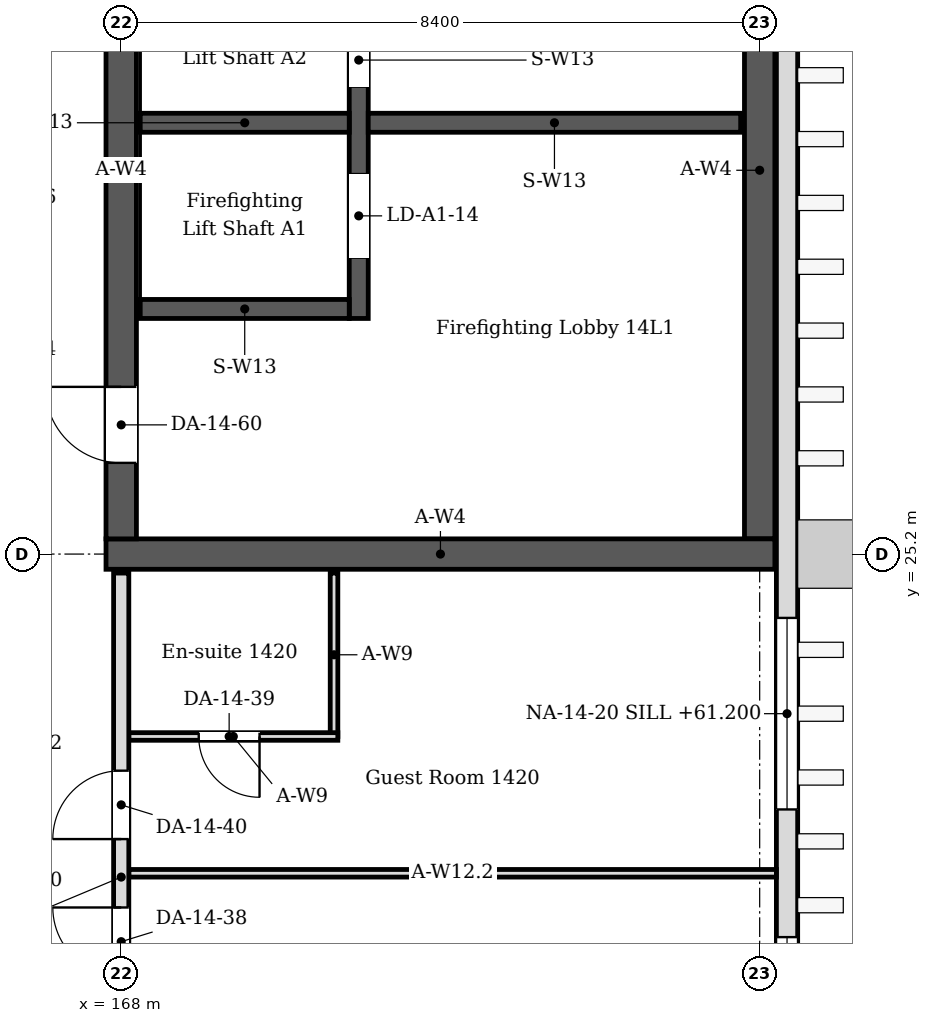
"""IFC4 building model, lengths in metres.
Left out: names, types, materials, properties, quantities, classifications, styles, units other than length and angle.
Written with IfcOpenShell. Run it as: python <this file> out.ifc"""

import sys

from ifc_helpers import new_model, si_unit, direction, frame, frame_2d, origin, place, context, subcontext, project, spatial, rectangle, extrude, element, fill, save


model = new_model("IFC4")
c1 = context("Model", 3, precision=1e-05, world=origin(), true_north=direction((0.0, 1.0)))
c2 = subcontext(c1, "Body", "Model", "MODEL_VIEW")
j1 = project(units=[si_unit("LENGTHUNIT", "METRE"), si_unit("PLANEANGLEUNIT", "RADIAN")], contexts=[c1])
p1 = place(None, origin())
s1 = spatial("IfcSite", under=j1, at=p1, CompositionType="ELEMENT")
p2 = place(p1, origin())
s2 = spatial("IfcBuilding", under=s1, at=p2, CompositionType="ELEMENT")
p3 = place(p2, frame((0.0, 0.0, 60.6)))
s3 = spatial("IfcBuildingStorey", under=s2, at=p3, CompositionType="ELEMENT", Elevation=60.6)
p4 = place(p3, frame((167.8, 25.2, 0.0), z_axis=(0.0, 0.0, 1.0), x_axis=(1.0, 0.0, 0.0)))
e1 = element("IfcWall", 1, at=p4, inside=s3, PredefinedType="SOLIDWALL", context=c2, shape_type="SweptSolid", body=[
    extrude(rectangle(XDim=8.8, YDim=0.4, at=frame_2d((4.4, 0.0))), origin(), (0.0, 0.0, 1.0), 4.05),
])
p5 = place(p3, frame((168.0, 25.4, 0.0), z_axis=(0.0, 0.0, 1.0), x_axis=(0.0, 1.0, 0.0)))
e2 = element("IfcWall", 2, at=p5, inside=s3, PredefinedType="SOLIDWALL", context=c2, shape_type="SweptSolid", body=[
    extrude(rectangle(XDim=16.4, YDim=0.4, at=frame_2d((8.2, 0.0))), origin(), (0.0, 0.0, 1.0), 4.05),
])
p6 = place(p5, frame((1.0, 0.0, 0.0)))
e3 = element("IfcOpeningElement", 3, at=p6, cuts=e2, PredefinedType="OPENING", context=c2, shape_type="SweptSolid", body=[
    extrude(rectangle(XDim=1.0, YDim=2.1, at=frame_2d((0.5, 1.05))), frame((0.0, 0.21, 0.0), z_axis=(0.0, -1.0, 0.0), x_axis=(1.0, 0.0, 0.0)), (0.0, 0.0, 1.0), 0.42),
])
p7 = place(p5, frame((14.4, 0.0, 0.0)))
e4 = element("IfcOpeningElement", 4, at=p7, cuts=e2, PredefinedType="OPENING", context=c2, shape_type="SweptSolid", body=[
    extrude(rectangle(XDim=1.4, YDim=2.1, at=frame_2d((0.7, 1.05))), frame((0.0, 0.21, 0.0), z_axis=(0.0, -1.0, 0.0), x_axis=(1.0, 0.0, 0.0)), (0.0, 0.0, 1.0), 0.42),
])
p8 = place(p3, frame((176.4, 25.4, 0.0), z_axis=(0.0, 0.0, 1.0), x_axis=(0.0, 1.0, 0.0)))
e5 = element("IfcWall", 5, at=p8, inside=s3, PredefinedType="SOLIDWALL", context=c2, shape_type="SweptSolid", body=[
    extrude(rectangle(XDim=16.4, YDim=0.4, at=frame_2d((8.2, 0.0))), origin(), (0.0, 0.0, 1.0), 4.05),
])
p9 = place(p3, frame((176.76, -0.22, 0.0), z_axis=(0.0, 0.0, 1.0), x_axis=(0.0, 1.0, 0.0)))
e6 = element("IfcWall", 6, at=p9, inside=s3, PredefinedType="SOLIDWALL", context=c2, shape_type="SweptSolid", body=[
    extrude(rectangle(XDim=67.64, YDim=0.28, at=frame_2d((33.82, 0.0))), origin(), (0.0, 0.0, 1.0), 4.05),
])
p10 = place(p9, frame((9.88, 0.0, 0.45)))
e7 = element("IfcOpeningElement", 7, at=p10, cuts=e6, PredefinedType="OPENING", context=c2, shape_type="SweptSolid", body=[
    extrude(rectangle(XDim=2.52, YDim=2.1, at=frame_2d((1.26, 1.05))), frame((0.0, 0.15, 0.0), z_axis=(0.0, -1.0, 0.0), x_axis=(1.0, 0.0, 0.0)), (0.0, 0.0, 1.0), 0.3),
])
p11 = place(p9, frame((14.08, 0.0, 0.6)))
e8 = element("IfcOpeningElement", 8, at=p11, cuts=e6, PredefinedType="OPENING", context=c2, shape_type="SweptSolid", body=[
    extrude(rectangle(XDim=2.52, YDim=2.4, at=frame_2d((1.26, 1.2))), frame((0.0, 0.15, 0.0), z_axis=(0.0, -1.0, 0.0), x_axis=(1.0, 0.0, 0.0)), (0.0, 0.0, 1.0), 0.3),
])
p12 = place(p9, frame((17.86, 0.0, 0.6)))
e9 = element("IfcOpeningElement", 9, at=p12, cuts=e6, PredefinedType="OPENING", context=c2, shape_type="SweptSolid", body=[
    extrude(rectangle(XDim=2.52, YDim=2.4, at=frame_2d((1.26, 1.2))), frame((0.0, 0.15, 0.0), z_axis=(0.0, -1.0, 0.0), x_axis=(1.0, 0.0, 0.0)), (0.0, 0.0, 1.0), 0.3),
])
p13 = place(p9, frame((22.06, 0.0, 0.6)))
e10 = element("IfcOpeningElement", 10, at=p13, cuts=e6, PredefinedType="OPENING", context=c2, shape_type="SweptSolid", body=[
    extrude(rectangle(XDim=2.52, YDim=2.4, at=frame_2d((1.26, 1.2))), frame((0.0, 0.15, 0.0), z_axis=(0.0, -1.0, 0.0), x_axis=(1.0, 0.0, 0.0)), (0.0, 0.0, 1.0), 0.3),
])
p14 = place(p9, frame((42.64, 0.0, 0.6)))
e11 = element("IfcOpeningElement", 11, at=p14, cuts=e6, PredefinedType="OPENING", context=c2, shape_type="SweptSolid", body=[
    extrude(rectangle(XDim=2.52, YDim=2.4, at=frame_2d((1.26, 1.2))), frame((0.0, 0.15, 0.0), z_axis=(0.0, -1.0, 0.0), x_axis=(1.0, 0.0, 0.0)), (0.0, 0.0, 1.0), 0.3),
])
p15 = place(p9, frame((46.84, 0.0, 0.6)))
e12 = element("IfcOpeningElement", 12, at=p15, cuts=e6, PredefinedType="OPENING", context=c2, shape_type="SweptSolid", body=[
    extrude(rectangle(XDim=2.52, YDim=2.4, at=frame_2d((1.26, 1.2))), frame((0.0, 0.15, 0.0), z_axis=(0.0, -1.0, 0.0), x_axis=(1.0, 0.0, 0.0)), (0.0, 0.0, 1.0), 0.3),
])
p16 = place(p9, frame((51.04, 0.0, 0.6)))
e13 = element("IfcOpeningElement", 13, at=p16, cuts=e6, PredefinedType="OPENING", context=c2, shape_type="SweptSolid", body=[
    extrude(rectangle(XDim=2.52, YDim=2.4, at=frame_2d((1.26, 1.2))), frame((0.0, 0.15, 0.0), z_axis=(0.0, -1.0, 0.0), x_axis=(1.0, 0.0, 0.0)), (0.0, 0.0, 1.0), 0.3),
])
p17 = place(p9, frame((55.24, 0.0, 0.6)))
e14 = element("IfcOpeningElement", 14, at=p17, cuts=e6, PredefinedType="OPENING", context=c2, shape_type="SweptSolid", body=[
    extrude(rectangle(XDim=2.52, YDim=2.4, at=frame_2d((1.26, 1.2))), frame((0.0, 0.15, 0.0), z_axis=(0.0, -1.0, 0.0), x_axis=(1.0, 0.0, 0.0)), (0.0, 0.0, 1.0), 0.3),
])
p18 = place(p3, frame((170.8, 22.8, 0.0), z_axis=(0.0, 0.0, 1.0), x_axis=(0.0, 1.0, 0.0)))
e15 = element("IfcWall", 15, at=p18, inside=s3, PredefinedType="PARTITIONING", context=c2, shape_type="SweptSolid", body=[
    extrude(rectangle(XDim=2.15, YDim=0.1, at=frame_2d((1.075, 0.0))), origin(), (0.0, 0.0, 1.0), 4.05),
])
p19 = place(p3, frame((170.85, 22.8, 0.0), z_axis=(0.0, 0.0, 1.0), x_axis=(-1.0, 0.0, 0.0)))
e16 = element("IfcWall", 16, at=p19, inside=s3, PredefinedType="PARTITIONING", context=c2, shape_type="SweptSolid", body=[
    extrude(rectangle(XDim=2.75, YDim=0.1, at=frame_2d((1.375, 0.0))), origin(), (0.0, 0.0, 1.0), 4.05),
])
p20 = place(p19, frame((1.03, 0.0, 0.0)))
e17 = element("IfcOpeningElement", 17, at=p20, cuts=e16, PredefinedType="OPENING", context=c2, shape_type="SweptSolid", body=[
    extrude(rectangle(XDim=0.8, YDim=2.1, at=frame_2d((0.4, 1.05))), frame((0.0, 0.06, 0.0), z_axis=(0.0, -1.0, 0.0), x_axis=(1.0, 0.0, 0.0)), (0.0, 0.0, 1.0), 0.12),
])
p21 = place(p3, frame((168.1, 21.0, 0.0), z_axis=(0.0, 0.0, 1.0), x_axis=(1.0, 0.0, 0.0)))
e18 = element("IfcWall", 18, at=p21, inside=s3, PredefinedType="PARTITIONING", context=c2, shape_type="SweptSolid", body=[
    extrude(rectangle(XDim=8.52, YDim=0.1, at=frame_2d((4.26, 0.0))), origin(), (0.0, 0.0, 1.0), 3.55),
])
p22 = place(p3, frame((168.0, 16.95, 0.0), z_axis=(0.0, 0.0, 1.0), x_axis=(0.0, 1.0, 0.0)))
e19 = element("IfcWall", 19, at=p22, inside=s3, PredefinedType="PARTITIONING", context=c2, shape_type="SweptSolid", body=[
    extrude(rectangle(XDim=8.0, YDim=0.2, at=frame_2d((4.0, 0.0))), origin(), (0.0, 0.0, 1.0), 3.45),
])
p23 = place(p22, frame((2.7, 0.0, 0.0)))
e20 = element("IfcOpeningElement", 20, at=p23, cuts=e19, PredefinedType="OPENING", context=c2, shape_type="SweptSolid", body=[
    extrude(rectangle(XDim=0.9, YDim=2.1, at=frame_2d((0.45, 1.05))), frame((0.0, 0.11, 0.0), z_axis=(0.0, -1.0, 0.0), x_axis=(1.0, 0.0, 0.0)), (0.0, 0.0, 1.0), 0.22),
])
p24 = place(p22, frame((4.5, 0.0, 0.0)))
e21 = element("IfcOpeningElement", 21, at=p24, cuts=e19, PredefinedType="OPENING", context=c2, shape_type="SweptSolid", body=[
    extrude(rectangle(XDim=0.9, YDim=2.1, at=frame_2d((0.45, 1.05))), frame((0.0, 0.11, 0.0), z_axis=(0.0, -1.0, 0.0), x_axis=(1.0, 0.0, 0.0)), (0.0, 0.0, 1.0), 0.22),
])
p25 = place(p3, frame((171.125, 28.3, 0.0), z_axis=(0.0, 0.0, 1.0), x_axis=(0.0, 1.0, 0.0)))
e22 = element("IfcWall", 22, at=p25, inside=s3, PredefinedType="SOLIDWALL", context=c2, shape_type="SweptSolid", body=[
    extrude(rectangle(XDim=10.9, YDim=0.25, at=frame_2d((5.45, 0.0))), origin(), (0.0, 0.0, 1.0), 4.05),
])
p26 = place(p25, frame((0.8, 0.0, 0.0)))
e23 = element("IfcOpeningElement", 23, at=p26, cuts=e22, PredefinedType="OPENING", context=c2, shape_type="SweptSolid", body=[
    extrude(rectangle(XDim=1.1, YDim=2.1, at=frame_2d((0.55, 1.05))), frame((0.0, 0.135, 0.0), z_axis=(0.0, -1.0, 0.0), x_axis=(1.0, 0.0, 0.0)), (0.0, 0.0, 1.0), 0.27),
])
p27 = place(p25, frame((3.05, 0.0, 0.0)))
e24 = element("IfcOpeningElement", 24, at=p27, cuts=e22, PredefinedType="OPENING", context=c2, shape_type="SweptSolid", body=[
    extrude(rectangle(XDim=1.1, YDim=2.1, at=frame_2d((0.55, 1.05))), frame((0.0, 0.135, 0.0), z_axis=(0.0, -1.0, 0.0), x_axis=(1.0, 0.0, 0.0)), (0.0, 0.0, 1.0), 0.27),
])
p28 = place(p25, frame((5.1, 0.0, 0.0)))
e25 = element("IfcOpeningElement", 25, at=p28, cuts=e22, PredefinedType="OPENING", context=c2, shape_type="SweptSolid", body=[
    extrude(rectangle(XDim=1.1, YDim=2.1, at=frame_2d((0.55, 1.05))), frame((0.0, 0.135, 0.0), z_axis=(0.0, -1.0, 0.0), x_axis=(1.0, 0.0, 0.0)), (0.0, 0.0, 1.0), 0.27),
])
p29 = place(p25, frame((7.15, 0.0, 0.0)))
e26 = element("IfcOpeningElement", 26, at=p29, cuts=e22, PredefinedType="OPENING", context=c2, shape_type="SweptSolid", body=[
    extrude(rectangle(XDim=1.1, YDim=2.1, at=frame_2d((0.55, 1.05))), frame((0.0, 0.135, 0.0), z_axis=(0.0, -1.0, 0.0), x_axis=(1.0, 0.0, 0.0)), (0.0, 0.0, 1.0), 0.27),
])
p30 = place(p25, frame((9.2, 0.0, 0.0)))
e27 = element("IfcOpeningElement", 27, at=p30, cuts=e22, PredefinedType="OPENING", context=c2, shape_type="SweptSolid", body=[
    extrude(rectangle(XDim=1.1, YDim=2.1, at=frame_2d((0.55, 1.05))), frame((0.0, 0.135, 0.0), z_axis=(0.0, -1.0, 0.0), x_axis=(1.0, 0.0, 0.0)), (0.0, 0.0, 1.0), 0.27),
])
for number, where, z_axis, x_axis in (
    (28, (168.25, 28.425, 0.0), (0.0, 0.0, 1.0), (1.0, 0.0, 0.0)),
    (29, (168.25, 30.875, 0.0), (0.0, 0.0, 1.0), (1.0, 0.0, 0.0)),
):
    element("IfcWall", number, at=place(p3, frame(where, z_axis=z_axis, x_axis=x_axis)), inside=s3, PredefinedType="SOLIDWALL", context=c2, shape_type="SweptSolid", body=[
        extrude(rectangle(XDim=2.75, YDim=0.25, at=frame_2d((1.375, 0.0))), origin(), (0.0, 0.0, 1.0), 4.05),
    ])
p31 = place(p3, frame((171.25, 30.875, 0.0), z_axis=(0.0, 0.0, 1.0), x_axis=(1.0, 0.0, 0.0)))
e30 = element("IfcWall", 30, at=p31, inside=s3, PredefinedType="SOLIDWALL", context=c2, shape_type="SweptSolid", body=[
    extrude(rectangle(XDim=4.9, YDim=0.25, at=frame_2d((2.45, 0.0))), origin(), (0.0, 0.0, 1.0), 4.05),
])
p32 = place(p12, origin())
e31 = element("IfcWindow", 31, at=p32, inside=s3, PartitioningType="SINGLE_PANEL", PredefinedType="WINDOW", context=c2, shape_type="SweptSolid", body=[
    extrude(rectangle(XDim=2.52, YDim=2.4, at=frame_2d((1.26, 1.2))), frame((0.0, 0.03, 0.0), z_axis=(0.0, -1.0, 0.0), x_axis=(1.0, 0.0, 0.0)), (0.0, 0.0, 1.0), 0.06),
])
fill(e9, e31)
p33 = place(p13, origin())
e32 = element("IfcWindow", 32, at=p33, inside=s3, PartitioningType="SINGLE_PANEL", PredefinedType="WINDOW", context=c2, shape_type="SweptSolid", body=[
    extrude(rectangle(XDim=2.52, YDim=2.4, at=frame_2d((1.26, 1.2))), frame((0.0, 0.03, 0.0), z_axis=(0.0, -1.0, 0.0), x_axis=(1.0, 0.0, 0.0)), (0.0, 0.0, 1.0), 0.06),
])
fill(e10, e32)
p34 = place(p23, origin())
e33 = element("IfcDoor", 33, at=p34, inside=s3, OperationType="SINGLE_SWING_RIGHT", PredefinedType="DOOR", context=c2, shape_type="SweptSolid", body=[
    extrude(rectangle(XDim=0.9, YDim=2.1, at=frame_2d((0.45, 1.05))), frame((0.0, 0.025, 0.0), z_axis=(0.0, -1.0, 0.0), x_axis=(1.0, 0.0, 0.0)), (0.0, 0.0, 1.0), 0.05),
])
fill(e20, e33)
p35 = place(p20, origin())
e34 = element("IfcDoor", 34, at=p35, inside=s3, OperationType="SINGLE_SWING_LEFT", PredefinedType="DOOR", context=c2, shape_type="SweptSolid", body=[
    extrude(rectangle(XDim=0.8, YDim=2.1, at=frame_2d((0.4, 1.05))), frame((0.0, 0.025, 0.0), z_axis=(0.0, -1.0, 0.0), x_axis=(1.0, 0.0, 0.0)), (0.0, 0.0, 1.0), 0.05),
])
fill(e17, e34)
p36 = place(p24, origin())
e35 = element("IfcDoor", 35, at=p36, inside=s3, OperationType="SINGLE_SWING_LEFT", PredefinedType="DOOR", context=c2, shape_type="SweptSolid", body=[
    extrude(rectangle(XDim=0.9, YDim=2.1, at=frame_2d((0.45, 1.05))), frame((0.0, 0.025, 0.0), z_axis=(0.0, -1.0, 0.0), x_axis=(1.0, 0.0, 0.0)), (0.0, 0.0, 1.0), 0.05),
])
fill(e21, e35)
p37 = place(p26, origin())
e36 = element("IfcDoor", 36, at=p37, inside=s3, OperationType="SLIDING_TO_LEFT", PredefinedType="DOOR", context=c2, shape_type="SweptSolid", body=[
    extrude(rectangle(XDim=1.1, YDim=2.1, at=frame_2d((0.55, 1.05))), frame((0.0, 0.025, 0.0), z_axis=(0.0, -1.0, 0.0), x_axis=(1.0, 0.0, 0.0)), (0.0, 0.0, 1.0), 0.05),
])
fill(e23, e36)
p38 = place(p27, origin())
e37 = element("IfcDoor", 37, at=p38, inside=s3, OperationType="SLIDING_TO_LEFT", PredefinedType="DOOR", context=c2, shape_type="SweptSolid", body=[
    extrude(rectangle(XDim=1.1, YDim=2.1, at=frame_2d((0.55, 1.05))), frame((0.0, 0.025, 0.0), z_axis=(0.0, -1.0, 0.0), x_axis=(1.0, 0.0, 0.0)), (0.0, 0.0, 1.0), 0.05),
])
fill(e24, e37)
p39 = place(p6, origin())
e38 = element("IfcDoor", 38, at=p39, inside=s3, OperationType="SINGLE_SWING_RIGHT", PredefinedType="DOOR", context=c2, shape_type="SweptSolid", body=[
    extrude(rectangle(XDim=1.0, YDim=2.1, at=frame_2d((0.5, 1.05))), frame((0.0, 0.025, 0.0), z_axis=(0.0, -1.0, 0.0), x_axis=(1.0, 0.0, 0.0)), (0.0, 0.0, 1.0), 0.05),
])
fill(e3, e38)
save(model, sys.argv[1])
